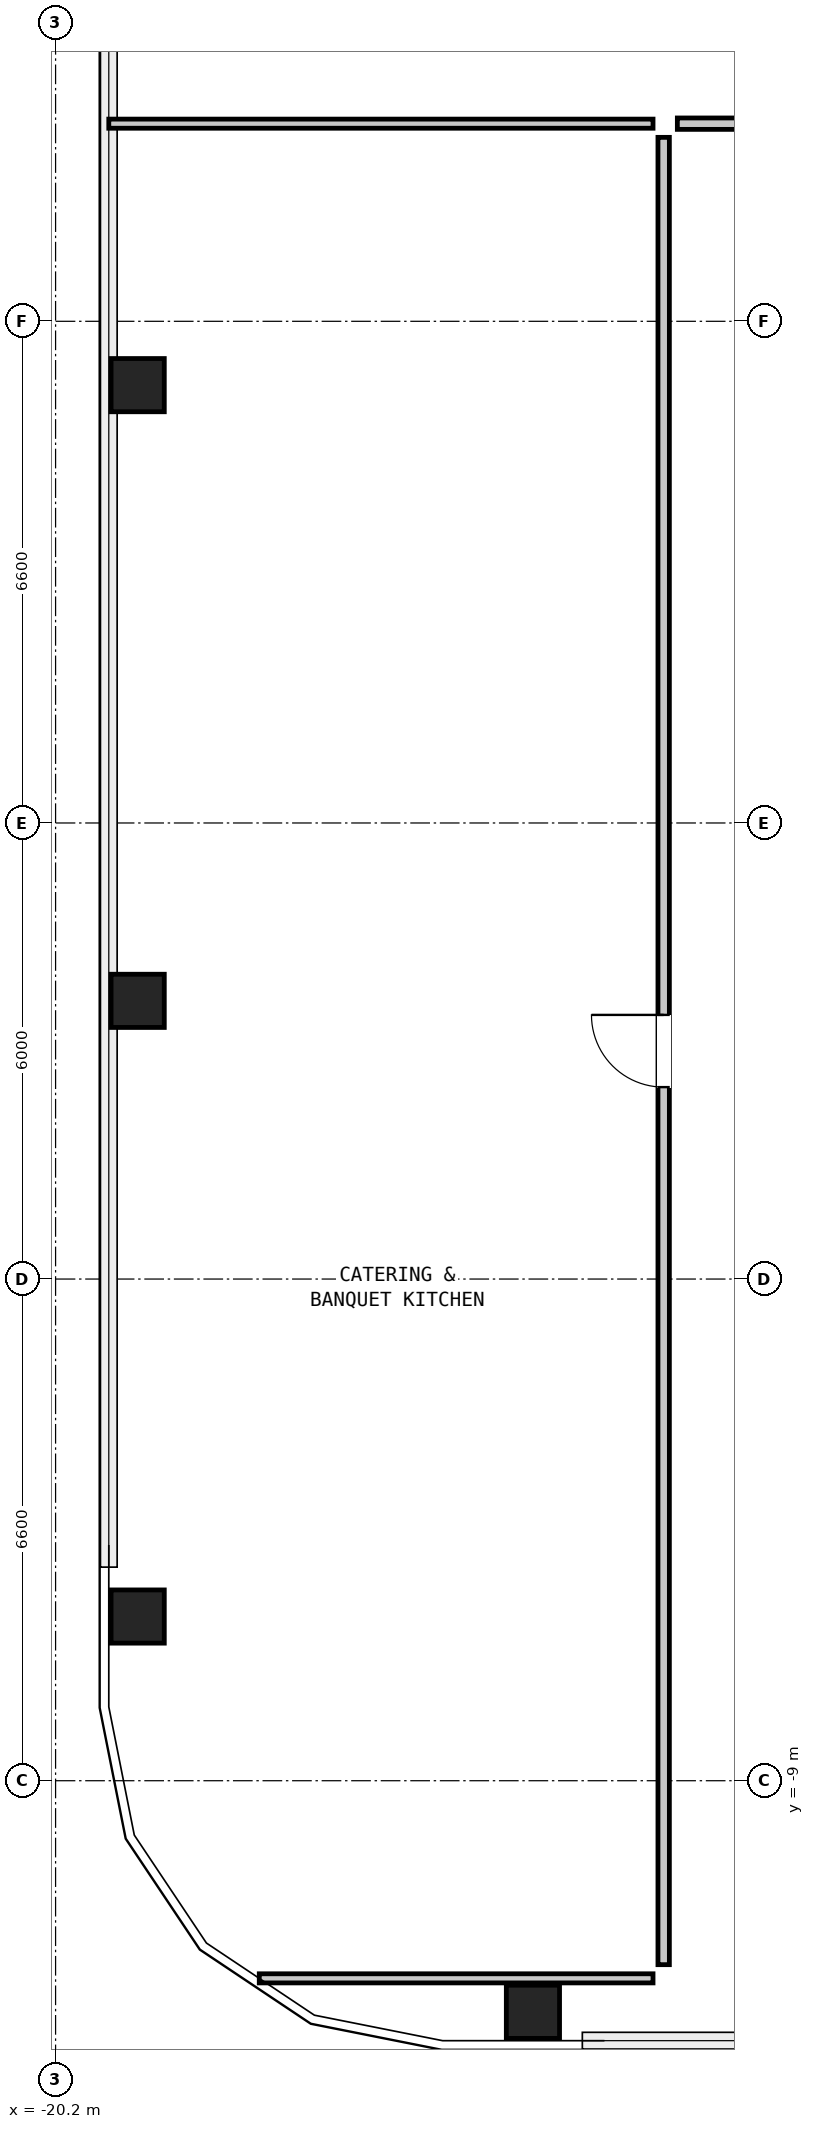
"""IFC4 building model, lengths in metres.
Left out: names, types, materials, properties, quantities, classifications, styles, units other than length and angle.
Written with IfcOpenShell. Run it as: python <this file> out.ifc"""

import sys

from ifc_helpers import new_model, si_unit, direction, frame, frame_2d, origin, origin_2d, place, context, subcontext, project, spatial, rectangle, hollow_rectangle, extrude, element, fill, save


model = new_model("IFC4")
c1 = context("Model", 3, precision=1e-05, world=origin(), true_north=direction((0.0, 1.0)))
c2 = subcontext(c1, "Body", "Model", "MODEL_VIEW")
j1 = project(units=[si_unit("LENGTHUNIT", "METRE"), si_unit("PLANEANGLEUNIT", "RADIAN")], contexts=[c1])
p1 = place(None, origin())
s1 = spatial("IfcSite", under=j1, at=p1, CompositionType="ELEMENT")
p2 = place(p1, origin())
s2 = spatial("IfcBuilding", under=s1, at=p2, CompositionType="ELEMENT")
p3 = place(p2, frame((0.0, 0.0, 148.2)))
s3 = spatial("IfcBuildingStorey", under=s2, at=p3, CompositionType="ELEMENT", Elevation=148.2)
for number, where, z_axis, x_axis in (
    (1, (-13.92, -12.04, 0.0), (0.0, 0.0, 1.0), (1.0, 0.0, 0.0)),
    (2, (-19.12, 9.36, 0.0), (0.0, 0.0, 1.0), (0.0, 1.0, 0.0)),
    (3, (-19.12, 1.26, 0.0), (0.0, 0.0, 1.0), (0.0, 1.0, 0.0)),
    (4, (-19.12, -6.84, 0.0), (0.0, 0.0, 1.0), (0.0, 1.0, 0.0)),
):
    element("IfcColumn", number, at=place(p3, frame(where, z_axis=z_axis, x_axis=x_axis)), inside=s3, PredefinedType="COLUMN", context=c2, shape_type="SweptSolid", body=[
        extrude(hollow_rectangle(XDim=0.7, YDim=0.7, WallThickness=0.045, at=origin_2d()), origin(), (0.0, 0.0, 1.0), 3.6),
    ])
p4 = place(p3, frame((-19.5, 12.8, 0.0), z_axis=(0.0, 0.0, 1.0), x_axis=(1.0, 0.0, 0.0)))
e5 = element("IfcWall", 5, at=p4, inside=s3, PredefinedType="PARTITIONING", context=c2, shape_type="SweptSolid", body=[
    extrude(rectangle(XDim=7.16, YDim=0.12, at=frame_2d((3.58, 0.0))), origin(), (0.0, 0.0, 1.0), 3.22),
])
p5 = place(p3, frame((-17.52, -11.6, 0.0), z_axis=(0.0, 0.0, 1.0), x_axis=(1.0, 0.0, 0.0)))
e6 = element("IfcWall", 6, at=p5, inside=s3, PredefinedType="PARTITIONING", context=c2, shape_type="SweptSolid", body=[
    extrude(rectangle(XDim=5.18, YDim=0.12, at=frame_2d((2.59, 0.0))), origin(), (0.0, 0.0, 1.0), 2.082),
])
p6 = place(p3, frame((-12.02, 12.8, 0.0), z_axis=(0.0, 0.0, 1.0), x_axis=(1.0, 0.0, 0.0)))
e7 = element("IfcWall", 7, at=p6, inside=s3, PredefinedType="PARTITIONING", context=c2, shape_type="SweptSolid", body=[
    extrude(rectangle(XDim=6.04, YDim=0.15, at=frame_2d((3.02, 0.0))), origin(), (0.0, 0.0, 1.0), 3.22),
])
p7 = place(p6, frame((2.42, 0.0, 0.0)))
e8 = element("IfcOpeningElement", 8, at=p7, cuts=e7, PredefinedType="OPENING", context=c2, shape_type="SweptSolid", body=[
    extrude(rectangle(XDim=1.2, YDim=2.1, at=frame_2d((0.6, 1.05))), frame((0.0, 0.087, 0.0), z_axis=(0.0, -1.0, 0.0), x_axis=(1.0, 0.0, 0.0)), (0.0, 0.0, 1.0), 0.174),
])
p8 = place(p3, frame((-12.2, -11.42, 0.0), z_axis=(0.0, 0.0, 1.0), x_axis=(0.0, 1.0, 0.0)))
e9 = element("IfcWall", 9, at=p8, inside=s3, PredefinedType="PARTITIONING", context=c2, shape_type="SweptSolid", body=[
    extrude(rectangle(XDim=24.04, YDim=0.15, at=frame_2d((12.02, 0.0))), origin(), (0.0, 0.0, 1.0), 3.22),
])
p9 = place(p8, frame((11.545, 0.0, 0.0)))
e10 = element("IfcOpeningElement", 10, at=p9, cuts=e9, PredefinedType="OPENING", context=c2, shape_type="SweptSolid", body=[
    extrude(rectangle(XDim=0.95, YDim=2.1, at=frame_2d((0.475, 1.05))), frame((0.0, 0.087, 0.0), z_axis=(0.0, -1.0, 0.0), x_axis=(1.0, 0.0, 0.0)), (0.0, 0.0, 1.0), 0.174),
])
p10 = place(p9, origin())
e11 = element("IfcDoor", 11, at=p10, inside=s3, OperationType="SINGLE_SWING_RIGHT", PredefinedType="DOOR", context=c2, shape_type="SweptSolid", body=[
    extrude(rectangle(XDim=0.95, YDim=2.1, at=frame_2d((0.475, 1.05))), frame((0.0, 0.025, 0.0), z_axis=(0.0, -1.0, 0.0), x_axis=(1.0, 0.0, 0.0)), (0.0, 0.0, 1.0), 0.05),
])
fill(e10, e11)
save(model, sys.argv[1])
